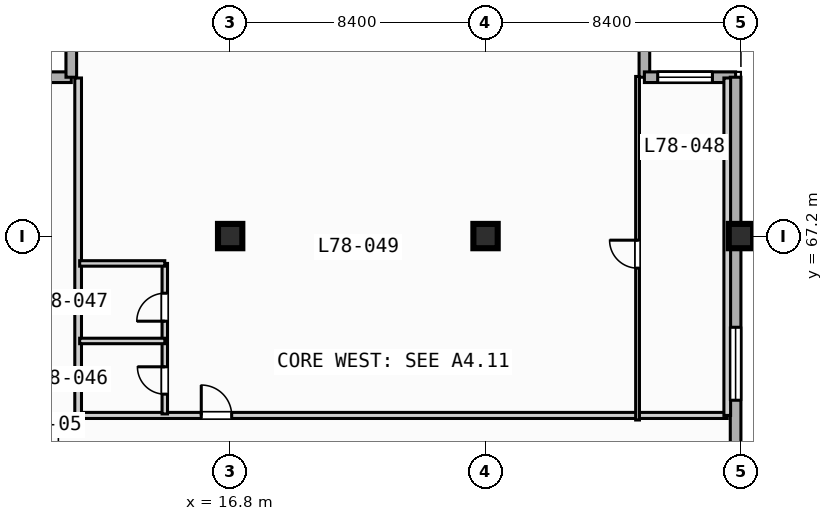
"""IFC4 building model, lengths in metres.
Left out: names, types, materials, properties, quantities, classifications, styles, units other than length and angle.
Written with IfcOpenShell. Run it as: python <this file> out.ifc"""

import sys

from ifc_helpers import new_model, si_unit, direction, frame, frame_2d, origin, origin_2d, place, context, subcontext, project, spatial, rectangle, extrude, element, fill, save


model = new_model("IFC4")
c1 = context("Model", 3, precision=1e-05, world=origin(), true_north=direction((0.0, 1.0)))
c2 = subcontext(c1, "Body", "Model", "MODEL_VIEW")
j1 = project(units=[si_unit("LENGTHUNIT", "METRE"), si_unit("PLANEANGLEUNIT", "RADIAN")], contexts=[c1])
p1 = place(None, origin())
s1 = spatial("IfcSite", under=j1, at=p1, CompositionType="ELEMENT")
p2 = place(p1, origin())
s2 = spatial("IfcBuilding", under=s1, at=p2, CompositionType="ELEMENT")
p3 = place(p2, frame((0.0, 0.0, 316.4)))
s3 = spatial("IfcBuildingStorey", under=s2, at=p3, CompositionType="ELEMENT", Elevation=316.4)
for number, where, z_axis, x_axis in (
    (1, (16.8, 67.2, 0.0), (0.0, 0.0, 1.0), (1.0, 0.0, 0.0)),
    (2, (25.2, 67.2, 0.0), (0.0, 0.0, 1.0), (1.0, 0.0, 0.0)),
    (3, (33.6, 67.2, 0.0), (0.0, 0.0, 1.0), (1.0, 0.0, 0.0)),
):
    element("IfcColumn", number, at=place(p3, frame(where, z_axis=z_axis, x_axis=x_axis)), inside=s3, PredefinedType="COLUMN", context=c2, shape_type="SweptSolid", body=[
        extrude(rectangle(XDim=0.8, YDim=0.8, at=origin_2d()), origin(), (0.0, 0.0, 1.0), 3.9),
    ])
for number, where, z_axis, x_axis in (
    (4, (8.575, 72.425, 0.0), (0.0, 0.0, 1.0), (1.0, 0.0, 0.0)),
    (5, (11.575, 72.425, 0.0), (0.0, 0.0, 1.0), (0.0, 1.0, 0.0)),
    (6, (30.425, 75.425, 0.0), (0.0, 0.0, 1.0), (0.0, -1.0, 0.0)),
):
    element("IfcWall", number, at=place(p3, frame(where, z_axis=z_axis, x_axis=x_axis)), inside=s3, PredefinedType="STANDARD", context=c2, shape_type="SweptSolid", body=[
        extrude(rectangle(XDim=3.0, YDim=0.35, at=frame_2d((1.5, 0.0))), origin(), (0.0, 0.0, 1.0), 3.67),
    ])
p4 = place(p3, frame((30.425, 72.425, 0.0), z_axis=(0.0, 0.0, 1.0), x_axis=(1.0, 0.0, 0.0)))
e7 = element("IfcWall", 7, at=p4, inside=s3, PredefinedType="STANDARD", context=c2, shape_type="SweptSolid", body=[
    extrude(rectangle(XDim=3.0, YDim=0.35, at=frame_2d((1.5, 0.0))), origin(), (0.0, 0.0, 1.0), 3.67),
])
p5 = place(p4, frame((0.438, 0.0, 0.85)))
e8 = element("IfcOpeningElement", 8, at=p5, cuts=e7, PredefinedType="OPENING", context=c2, shape_type="SweptSolid", body=[
    extrude(rectangle(XDim=1.8, YDim=1.8, at=frame_2d((0.9, 0.9))), frame((0.0, 0.185, 0.0), z_axis=(0.0, -1.0, 0.0), x_axis=(1.0, 0.0, 0.0)), (0.0, 0.0, 1.0), 0.37),
])
p6 = place(p3, frame((33.425, 72.425, 0.0), z_axis=(0.0, 0.0, 1.0), x_axis=(0.0, -1.0, 0.0)))
e9 = element("IfcWall", 9, at=p6, inside=s3, PredefinedType="STANDARD", context=c2, shape_type="SweptSolid", body=[
    extrude(rectangle(XDim=39.0, YDim=0.35, at=frame_2d((19.5, 0.0))), origin(), (0.0, 0.0, 1.0), 3.67),
])
p7 = place(p6, frame((33.725, 0.0, 0.85)))
e10 = element("IfcOpeningElement", 10, at=p7, cuts=e9, PredefinedType="OPENING", context=c2, shape_type="SweptSolid", body=[
    extrude(rectangle(XDim=1.8, YDim=1.8, at=frame_2d((0.9, 0.9))), frame((0.0, 0.185, 0.0), z_axis=(0.0, -1.0, 0.0), x_axis=(1.0, 0.0, 0.0)), (0.0, 0.0, 1.0), 0.37),
])
p8 = place(p6, frame((8.225, 0.0, 0.85)))
e11 = element("IfcOpeningElement", 11, at=p8, cuts=e9, PredefinedType="OPENING", context=c2, shape_type="SweptSolid", body=[
    extrude(rectangle(XDim=2.4, YDim=1.95, at=frame_2d((1.2, 0.975))), frame((0.0, 0.185, 0.0), z_axis=(0.0, -1.0, 0.0), x_axis=(1.0, 0.0, 0.0)), (0.0, 0.0, 1.0), 0.37),
])
p9 = place(p3, frame((11.8, 61.3, 0.0), z_axis=(0.0, 0.0, 1.0), x_axis=(1.0, 0.0, 0.0)))
e12 = element("IfcWall", 12, at=p9, inside=s3, PredefinedType="PARTITIONING", context=c2, shape_type="SweptSolid", body=[
    extrude(rectangle(XDim=21.35, YDim=0.2, at=frame_2d((10.675, 0.0))), origin(), (0.0, 0.0, 1.0), 3.67),
])
p10 = place(p9, frame((4.05, 0.0, 0.0)))
e13 = element("IfcOpeningElement", 13, at=p10, cuts=e12, PredefinedType="OPENING", context=c2, shape_type="SweptSolid", body=[
    extrude(rectangle(XDim=1.0, YDim=2.15, at=frame_2d((0.5, 1.075))), frame((0.0, 0.11, 0.0), z_axis=(0.0, -1.0, 0.0), x_axis=(1.0, 0.0, 0.0)), (0.0, 0.0, 1.0), 0.22),
])
for number, where, z_axis, x_axis in (
    (14, (33.15, 61.3, 0.0), (0.0, 0.0, 1.0), (0.0, 1.0, 0.0)),
    (15, (11.8, 61.3, 0.0), (0.0, 0.0, 1.0), (0.0, 1.0, 0.0)),
):
    element("IfcWall", number, at=place(p3, frame(where, z_axis=z_axis, x_axis=x_axis)), inside=s3, PredefinedType="PARTITIONING", context=c2, shape_type="SweptSolid", body=[
        extrude(rectangle(XDim=11.1, YDim=0.22, at=frame_2d((5.55, 0.0))), origin(), (0.0, 0.0, 1.0), 3.67),
    ])
p11 = place(p3, frame((14.65, 61.35, 0.0), z_axis=(0.0, 0.0, 1.0), x_axis=(0.0, 1.0, 0.0)))
e16 = element("IfcWall", 16, at=p11, inside=s3, PredefinedType="PLUMBINGWALL", context=c2, shape_type="SweptSolid", body=[
    extrude(rectangle(XDim=4.95, YDim=0.18, at=frame_2d((2.475, 0.0))), origin(), (0.0, 0.0, 1.0), 3.67),
])
p12 = place(p11, frame((0.65, 0.0, 0.0)))
e17 = element("IfcOpeningElement", 17, at=p12, cuts=e16, PredefinedType="OPENING", context=c2, shape_type="SweptSolid", body=[
    extrude(rectangle(XDim=0.9, YDim=2.1, at=frame_2d((0.45, 1.05))), frame((0.0, 0.1, 0.0), z_axis=(0.0, -1.0, 0.0), x_axis=(1.0, 0.0, 0.0)), (0.0, 0.0, 1.0), 0.2),
])
p13 = place(p11, frame((3.05, 0.0, 0.0)))
e18 = element("IfcOpeningElement", 18, at=p13, cuts=e16, PredefinedType="OPENING", context=c2, shape_type="SweptSolid", body=[
    extrude(rectangle(XDim=0.92, YDim=2.1, at=frame_2d((0.46, 1.05))), frame((0.0, 0.1, 0.0), z_axis=(0.0, -1.0, 0.0), x_axis=(1.0, 0.0, 0.0)), (0.0, 0.0, 1.0), 0.2),
])
for number, where, z_axis, x_axis in (
    (19, (11.85, 63.75, 0.0), (0.0, 0.0, 1.0), (1.0, 0.0, 0.0)),
    (20, (11.85, 66.3, 0.0), (0.0, 0.0, 1.0), (1.0, 0.0, 0.0)),
):
    element("IfcWall", number, at=place(p3, frame(where, z_axis=z_axis, x_axis=x_axis)), inside=s3, PredefinedType="PLUMBINGWALL", context=c2, shape_type="SweptSolid", body=[
        extrude(rectangle(XDim=2.8, YDim=0.18, at=frame_2d((1.4, 0.0))), origin(), (0.0, 0.0, 1.0), 3.67),
    ])
p14 = place(p3, frame((30.2, 61.15, 0.0), z_axis=(0.0, 0.0, 1.0), x_axis=(0.0, 1.0, 0.0)))
e21 = element("IfcWall", 21, at=p14, inside=s3, PredefinedType="PARTITIONING", context=c2, shape_type="SweptSolid", body=[
    extrude(rectangle(XDim=11.3, YDim=0.125, at=frame_2d((5.65, 0.0))), origin(), (0.0, 0.0, 1.0), 3.67),
])
p15 = place(p14, frame((4.995, 0.0, 0.0)))
e22 = element("IfcOpeningElement", 22, at=p15, cuts=e21, PredefinedType="OPENING", context=c2, shape_type="SweptSolid", body=[
    extrude(rectangle(XDim=0.92, YDim=2.1, at=frame_2d((0.46, 1.05))), frame((0.0, 0.073, 0.0), z_axis=(0.0, -1.0, 0.0), x_axis=(1.0, 0.0, 0.0)), (0.0, 0.0, 1.0), 0.145),
])
p16 = place(p5, origin())
e23 = element("IfcWindow", 23, at=p16, inside=s3, PartitioningType="SINGLE_PANEL", PredefinedType="WINDOW", context=c2, shape_type="SweptSolid", body=[
    extrude(rectangle(XDim=1.8, YDim=1.8, at=frame_2d((0.9, 0.9))), frame((0.0, 0.03, 0.0), z_axis=(0.0, -1.0, 0.0), x_axis=(1.0, 0.0, 0.0)), (0.0, 0.0, 1.0), 0.06),
])
fill(e8, e23)
p17 = place(p8, origin())
e24 = element("IfcWindow", 24, at=p17, inside=s3, PartitioningType="SINGLE_PANEL", PredefinedType="WINDOW", context=c2, shape_type="SweptSolid", body=[
    extrude(rectangle(XDim=2.4, YDim=1.95, at=frame_2d((1.2, 0.975))), frame((0.0, 0.03, 0.0), z_axis=(0.0, -1.0, 0.0), x_axis=(1.0, 0.0, 0.0)), (0.0, 0.0, 1.0), 0.06),
])
fill(e11, e24)
p18 = place(p10, origin())
e25 = element("IfcDoor", 25, at=p18, inside=s3, OperationType="SINGLE_SWING_LEFT", PredefinedType="DOOR", context=c2, shape_type="SweptSolid", body=[
    extrude(rectangle(XDim=1.0, YDim=2.15, at=frame_2d((0.5, 1.075))), frame((0.0, 0.025, 0.0), z_axis=(0.0, -1.0, 0.0), x_axis=(1.0, 0.0, 0.0)), (0.0, 0.0, 1.0), 0.05),
])
fill(e13, e25)
p19 = place(p12, origin())
e26 = element("IfcDoor", 26, at=p19, inside=s3, OperationType="SINGLE_SWING_RIGHT", PredefinedType="DOOR", context=c2, shape_type="SweptSolid", body=[
    extrude(rectangle(XDim=0.9, YDim=2.1, at=frame_2d((0.45, 1.05))), frame((0.0, 0.025, 0.0), z_axis=(0.0, -1.0, 0.0), x_axis=(1.0, 0.0, 0.0)), (0.0, 0.0, 1.0), 0.05),
])
fill(e17, e26)
p20 = place(p13, origin())
e27 = element("IfcDoor", 27, at=p20, inside=s3, OperationType="SINGLE_SWING_LEFT", PredefinedType="DOOR", context=c2, shape_type="SweptSolid", body=[
    extrude(rectangle(XDim=0.92, YDim=2.1, at=frame_2d((0.46, 1.05))), frame((0.0, 0.025, 0.0), z_axis=(0.0, -1.0, 0.0), x_axis=(1.0, 0.0, 0.0)), (0.0, 0.0, 1.0), 0.05),
])
fill(e18, e27)
p21 = place(p15, origin())
e28 = element("IfcDoor", 28, at=p21, inside=s3, OperationType="SINGLE_SWING_RIGHT", PredefinedType="DOOR", context=c2, shape_type="SweptSolid", body=[
    extrude(rectangle(XDim=0.92, YDim=2.1, at=frame_2d((0.46, 1.05))), frame((0.0, 0.025, 0.0), z_axis=(0.0, -1.0, 0.0), x_axis=(1.0, 0.0, 0.0)), (0.0, 0.0, 1.0), 0.05),
])
fill(e22, e28)
save(model, sys.argv[1])
